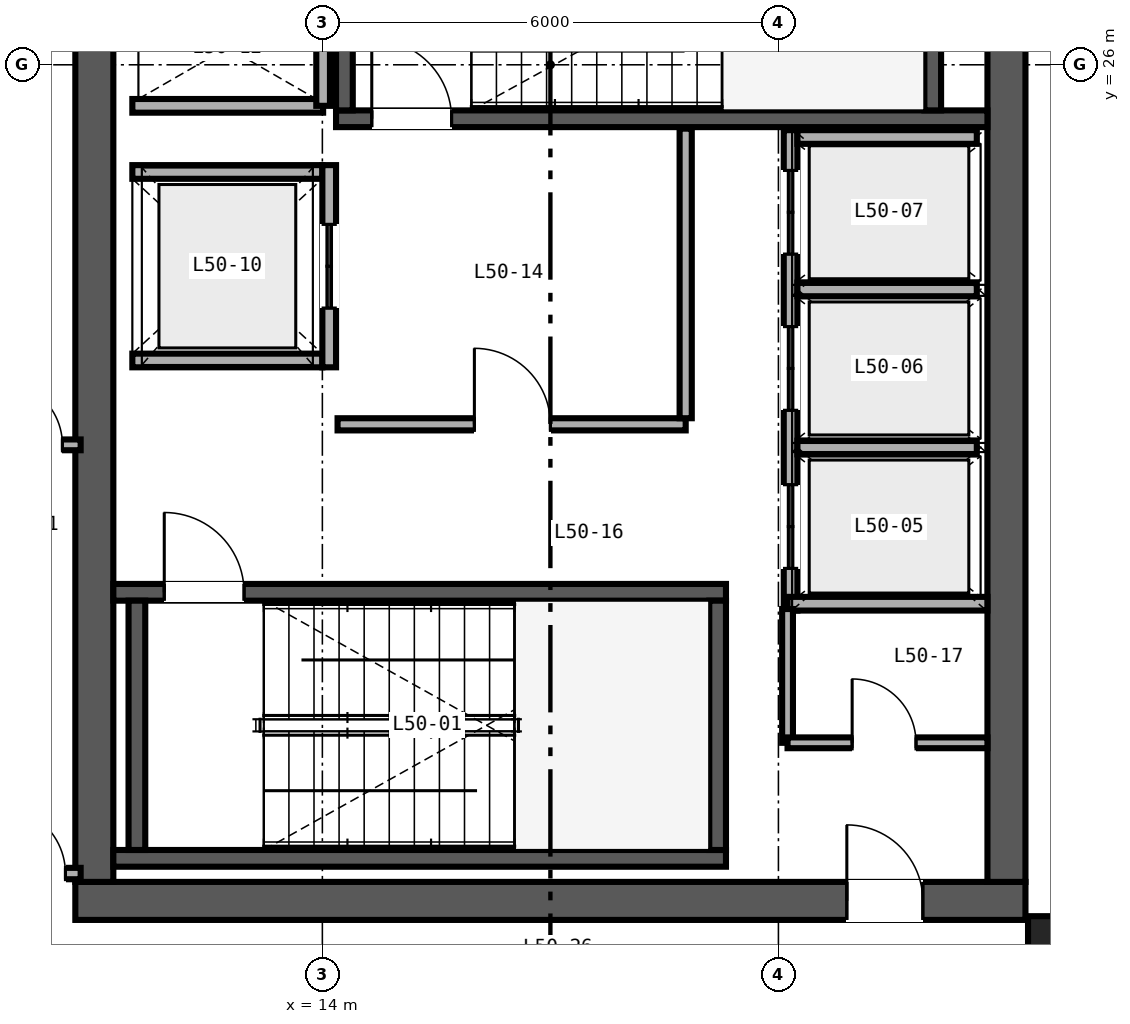
"""IFC4 building model, lengths in metres.
Left out: names, types, materials, properties, quantities, classifications, styles, units other than length and angle.
Written with IfcOpenShell. Run it as: python <this file> out.ifc"""

import sys

from ifc_helpers import new_model, si_unit, direction, frame, frame_2d, origin, origin_2d, place, context, subcontext, project, spatial, rectangle, i_section, extrude, source, transform, mapped, element, fill, save


model = new_model("IFC4")
c1 = context("Model", 3, precision=1e-05, world=origin(), true_north=direction((0.0, 1.0)))
c2 = subcontext(c1, "Body", "Model", "MODEL_VIEW")
j1 = project(units=[si_unit("LENGTHUNIT", "METRE"), si_unit("PLANEANGLEUNIT", "RADIAN")], contexts=[c1])
p1 = place(None, origin())
s1 = spatial("IfcSite", under=j1, at=p1, CompositionType="ELEMENT")
p2 = place(p1, origin())
s2 = spatial("IfcBuilding", under=s1, at=p2, CompositionType="ELEMENT")
p3 = place(p2, frame((0.0, 0.0, 199.2)))
s3 = spatial("IfcBuildingStorey", under=s2, at=p3, CompositionType="ELEMENT", Elevation=199.2)
p4 = place(p3, frame((10.75, 15.0, 0.0), z_axis=(0.0, 0.0, 1.0), x_axis=(1.0, 0.0, 0.0)))
e1 = element("IfcWall", 1, at=p4, inside=s3, PredefinedType="SHEAR", context=c2, shape_type="SweptSolid", body=[
    extrude(rectangle(XDim=12.5, YDim=0.5, at=frame_2d((6.25, 0.0))), origin(), (0.0, 0.0, 1.0), 3.37),
])
p5 = place(p4, frame((10.15, 0.0, 0.0)))
e2 = element("IfcOpeningElement", 2, at=p5, cuts=e1, PredefinedType="OPENING", context=c2, shape_type="SweptSolid", body=[
    extrude(rectangle(XDim=1.0, YDim=2.15, at=frame_2d((0.5, 1.075))), frame((0.0, 0.26, 0.0), z_axis=(0.0, -1.0, 0.0), x_axis=(1.0, 0.0, 0.0)), (0.0, 0.0, 1.0), 0.52),
])
for number, where, z_axis, x_axis in (
    (3, (11.0, 15.25, 0.0), (0.0, 0.0, 1.0), (0.0, 1.0, 0.0)),
    (4, (23.0, 15.25, 0.0), (0.0, 0.0, 1.0), (0.0, 1.0, 0.0)),
):
    element("IfcWall", number, at=place(p3, frame(where, z_axis=z_axis, x_axis=x_axis)), inside=s3, PredefinedType="SHEAR", context=c2, shape_type="SweptSolid", body=[
        extrude(rectangle(XDim=21.5, YDim=0.5, at=frame_2d((10.75, 0.0))), origin(), (0.0, 0.0, 1.0), 3.37),
    ])
p6 = place(p3, frame((11.25, 15.56, 0.0), z_axis=(0.0, 0.0, 1.0), x_axis=(1.0, 0.0, 0.0)))
e5 = element("IfcWall", 5, at=p6, inside=s3, PredefinedType="SHEAR", context=c2, shape_type="SweptSolid", body=[
    extrude(rectangle(XDim=8.06, YDim=0.22, at=frame_2d((4.03, 0.0))), origin(), (0.0, 0.0, 1.0), 3.4),
])
p7 = place(p3, frame((11.25, 19.06, 0.0), z_axis=(0.0, 0.0, 1.0), x_axis=(1.0, 0.0, 0.0)))
e6 = element("IfcWall", 6, at=p7, inside=s3, PredefinedType="SHEAR", context=c2, shape_type="SweptSolid", body=[
    extrude(rectangle(XDim=8.06, YDim=0.22, at=frame_2d((4.03, 0.0))), origin(), (0.0, 0.0, 1.0), 3.4),
])
p8 = place(p7, frame((0.67, 0.0, 0.0)))
e7 = element("IfcOpeningElement", 7, at=p8, cuts=e6, PredefinedType="OPENING", context=c2, shape_type="SweptSolid", body=[
    extrude(rectangle(XDim=1.05, YDim=2.15, at=frame_2d((0.525, 1.075))), frame((0.0, 0.12, 0.0), z_axis=(0.0, -1.0, 0.0), x_axis=(1.0, 0.0, 0.0)), (0.0, 0.0, 1.0), 0.24),
])
for number, where, z_axis, x_axis in (
    (8, (11.56, 15.67, 0.0), (0.0, 0.0, 1.0), (0.0, 1.0, 0.0)),
    (9, (19.2, 15.67, 0.0), (0.0, 0.0, 1.0), (0.0, 1.0, 0.0)),
):
    element("IfcWall", number, at=place(p3, frame(where, z_axis=z_axis, x_axis=x_axis)), inside=s3, PredefinedType="SHEAR", context=c2, shape_type="SweptSolid", body=[
        extrude(rectangle(XDim=3.28, YDim=0.22, at=frame_2d((1.64, 0.0))), origin(), (0.0, 0.0, 1.0), 3.4),
    ])
p9 = place(p3, frame((14.18, 25.29, 0.0), z_axis=(0.0, 0.0, 1.0), x_axis=(1.0, 0.0, 0.0)))
e10 = element("IfcWall", 10, at=p9, inside=s3, PredefinedType="SHEAR", context=c2, shape_type="SweptSolid", body=[
    extrude(rectangle(XDim=8.57, YDim=0.22, at=frame_2d((4.285, 0.0))), origin(), (0.0, 0.0, 1.0), 3.4),
])
p10 = place(p9, frame((0.47, 0.0, 0.0)))
e11 = element("IfcOpeningElement", 11, at=p10, cuts=e10, PredefinedType="OPENING", context=c2, shape_type="SweptSolid", body=[
    extrude(rectangle(XDim=1.05, YDim=2.15, at=frame_2d((0.525, 1.075))), frame((0.0, 0.12, 0.0), z_axis=(0.0, -1.0, 0.0), x_axis=(1.0, 0.0, 0.0)), (0.0, 0.0, 1.0), 0.24),
])
for number, where, z_axis, x_axis in (
    (12, (14.29, 25.4, 0.0), (0.0, 0.0, 1.0), (0.0, 1.0, 0.0)),
    (13, (22.03, 25.4, 0.0), (0.0, 0.0, 1.0), (0.0, 1.0, 0.0)),
):
    element("IfcWall", number, at=place(p3, frame(where, z_axis=z_axis, x_axis=x_axis)), inside=s3, PredefinedType="SHEAR", context=c2, shape_type="SweptSolid", body=[
        extrude(rectangle(XDim=3.28, YDim=0.22, at=frame_2d((1.64, 0.0))), origin(), (0.0, 0.0, 1.0), 3.4),
    ])
m1 = source(origin(), c2, "Body", "SweptSolid", [
    extrude(i_section(OverallWidth=0.432, OverallDepth=0.498, WebThickness=0.056, FlangeThickness=0.089, FilletRadius=0.025, at=origin_2d()), origin(), (0.0, 0.0, 1.0), 3.37),
])
p11 = place(p3, frame((23.5, 14.55, 0.0), z_axis=(0.0, 0.0, 1.0), x_axis=(1.0, 0.0, 0.0)))
e14 = element("IfcColumn", 14, at=p11, inside=s3, PredefinedType="COLUMN", context=c2, shape_type="MappedRepresentation", body=[
    mapped(m1, transform((0.0, 0.0, 0.0), scale=1.0)),
])
p12 = place(p3, frame((20.16, 18.82, 0.0), z_axis=(0.0, 0.0, 1.0), x_axis=(0.0, 1.0, 0.0)))
e15 = element("IfcWall", 15, at=p12, inside=s3, PredefinedType="SOLIDWALL", context=c2, shape_type="SweptSolid", body=[
    extrude(rectangle(XDim=6.32, YDim=0.18, at=frame_2d((3.16, 0.0))), origin(), (0.0, 0.0, 1.0), 2.47),
])
p13 = place(p12, frame((0.555, 0.0, 0.0)))
e16 = element("IfcOpeningElement", 16, at=p13, cuts=e15, PredefinedType="OPENING", context=c2, shape_type="SweptSolid", body=[
    extrude(rectangle(XDim=1.1, YDim=2.2, at=frame_2d((0.55, 1.1))), frame((0.0, 0.1, 0.0), z_axis=(0.0, -1.0, 0.0), x_axis=(1.0, 0.0, 0.0)), (0.0, 0.0, 1.0), 0.2),
])
p14 = place(p12, frame((2.635, 0.0, 0.0)))
e17 = element("IfcOpeningElement", 17, at=p14, cuts=e15, PredefinedType="OPENING", context=c2, shape_type="SweptSolid", body=[
    extrude(rectangle(XDim=1.1, YDim=2.2, at=frame_2d((0.55, 1.1))), frame((0.0, 0.1, 0.0), z_axis=(0.0, -1.0, 0.0), x_axis=(1.0, 0.0, 0.0)), (0.0, 0.0, 1.0), 0.2),
])
p15 = place(p12, frame((4.69, 0.0, 0.0)))
e18 = element("IfcOpeningElement", 18, at=p15, cuts=e15, PredefinedType="OPENING", context=c2, shape_type="SweptSolid", body=[
    extrude(rectangle(XDim=1.1, YDim=2.2, at=frame_2d((0.55, 1.1))), frame((0.0, 0.1, 0.0), z_axis=(0.0, -1.0, 0.0), x_axis=(1.0, 0.0, 0.0)), (0.0, 0.0, 1.0), 0.2),
])
p16 = place(p3, frame((20.12, 18.91, 0.0), z_axis=(0.0, 0.0, 1.0), x_axis=(1.0, 0.0, 0.0)))
e19 = element("IfcWall", 19, at=p16, inside=s3, PredefinedType="SOLIDWALL", context=c2, shape_type="SweptSolid", body=[
    extrude(rectangle(XDim=2.63, YDim=0.18, at=frame_2d((1.315, 0.0))), origin(), (0.0, 0.0, 1.0), 3.37),
])
p17 = place(p3, frame((20.25, 25.05, 0.0), z_axis=(0.0, 0.0, 1.0), x_axis=(1.0, 0.0, 0.0)))
e20 = element("IfcWall", 20, at=p17, inside=s3, PredefinedType="SOLIDWALL", context=c2, shape_type="SweptSolid", body=[
    extrude(rectangle(XDim=2.36, YDim=0.18, at=frame_2d((1.18, 0.0))), origin(), (0.0, 0.0, 1.0), 3.37),
])
p18 = place(p3, frame((20.25, 20.965, 0.0), z_axis=(0.0, 0.0, 1.0), x_axis=(1.0, 0.0, 0.0)))
e21 = element("IfcWall", 21, at=p18, inside=s3, PredefinedType="SOLIDWALL", context=c2, shape_type="SweptSolid", body=[
    extrude(rectangle(XDim=2.36, YDim=0.18, at=frame_2d((1.18, 0.0))), origin(), (0.0, 0.0, 1.0), 2.47),
])
p19 = place(p3, frame((20.25, 23.045, 0.0), z_axis=(0.0, 0.0, 1.0), x_axis=(1.0, 0.0, 0.0)))
e22 = element("IfcWall", 22, at=p19, inside=s3, PredefinedType="SOLIDWALL", context=c2, shape_type="SweptSolid", body=[
    extrude(rectangle(XDim=2.36, YDim=0.18, at=frame_2d((1.18, 0.0))), origin(), (0.0, 0.0, 1.0), 3.37),
])
for number, where, z_axis, x_axis in (
    (23, (11.5, 22.11, 0.0), (0.0, 0.0, 1.0), (1.0, 0.0, 0.0)),
    (24, (11.5, 24.59, 0.0), (0.0, 0.0, 1.0), (1.0, 0.0, 0.0)),
):
    element("IfcWall", number, at=place(p3, frame(where, z_axis=z_axis, x_axis=x_axis)), inside=s3, PredefinedType="SOLIDWALL", context=c2, shape_type="SweptSolid", body=[
        extrude(rectangle(XDim=2.5, YDim=0.18, at=frame_2d((1.25, 0.0))), origin(), (0.0, 0.0, 1.0), 3.37),
    ])
p20 = place(p3, frame((14.09, 22.02, 0.0), z_axis=(0.0, 0.0, 1.0), x_axis=(0.0, 1.0, 0.0)))
e25 = element("IfcWall", 25, at=p20, inside=s3, PredefinedType="SOLIDWALL", context=c2, shape_type="SweptSolid", body=[
    extrude(rectangle(XDim=2.66, YDim=0.18, at=frame_2d((1.33, 0.0))), origin(), (0.0, 0.0, 1.0), 3.37),
])
p21 = place(p20, frame((0.78, 0.0, 0.0)))
e26 = element("IfcOpeningElement", 26, at=p21, cuts=e25, PredefinedType="OPENING", context=c2, shape_type="SweptSolid", body=[
    extrude(rectangle(XDim=1.1, YDim=2.2, at=frame_2d((0.55, 1.1))), frame((0.0, 0.1, 0.0), z_axis=(0.0, -1.0, 0.0), x_axis=(1.0, 0.0, 0.0)), (0.0, 0.0, 1.0), 0.2),
])
p22 = place(p3, frame((11.5, 25.46, 0.0), z_axis=(0.0, 0.0, 1.0), x_axis=(1.0, 0.0, 0.0)))
e27 = element("IfcWall", 27, at=p22, inside=s3, PredefinedType="SOLIDWALL", context=c2, shape_type="SweptSolid", body=[
    extrude(rectangle(XDim=2.51, YDim=0.18, at=frame_2d((1.255, 0.0))), origin(), (0.0, 0.0, 1.0), 3.37),
])
p23 = place(p3, frame((14.01, 25.46, 0.0), z_axis=(0.0, 0.0, 1.0), x_axis=(0.0, 1.0, 0.0)))
e28 = element("IfcWall", 28, at=p23, inside=s3, PredefinedType="SOLIDWALL", context=c2, shape_type="SweptSolid", body=[
    extrude(rectangle(XDim=3.08, YDim=0.18, at=frame_2d((1.54, 0.0))), origin(), (0.0, 0.0, 1.0), 3.37),
])
p24 = place(p3, frame((14.2, 21.27, 0.0), z_axis=(0.0, 0.0, 1.0), x_axis=(1.0, 0.0, 0.0)))
e29 = element("IfcWall", 29, at=p24, inside=s3, PredefinedType="PARTITIONING", context=c2, shape_type="SweptSolid", body=[
    extrude(rectangle(XDim=4.58, YDim=0.16, at=frame_2d((2.29, 0.0))), origin(), (0.0, 0.0, 1.0), 3.37),
])
p25 = place(p24, frame((1.8, 0.0, 0.0)))
e30 = element("IfcOpeningElement", 30, at=p25, cuts=e29, PredefinedType="OPENING", context=c2, shape_type="SweptSolid", body=[
    extrude(rectangle(XDim=1.0, YDim=2.15, at=frame_2d((0.5, 1.075))), frame((0.0, 0.09, 0.0), z_axis=(0.0, -1.0, 0.0), x_axis=(1.0, 0.0, 0.0)), (0.0, 0.0, 1.0), 0.18),
])
p26 = place(p3, frame((18.78, 21.35, 0.0), z_axis=(0.0, 0.0, 1.0), x_axis=(0.0, 1.0, 0.0)))
e31 = element("IfcWall", 31, at=p26, inside=s3, PredefinedType="PARTITIONING", context=c2, shape_type="SweptSolid", body=[
    extrude(rectangle(XDim=3.81, YDim=0.16, at=frame_2d((1.905, 0.0))), origin(), (0.0, 0.0, 1.0), 3.37),
])
p27 = place(p3, frame((20.12, 17.08, 0.0), z_axis=(0.0, 0.0, 1.0), x_axis=(0.0, 1.0, 0.0)))
e32 = element("IfcWall", 32, at=p27, inside=s3, PredefinedType="PARTITIONING", context=c2, shape_type="SweptSolid", body=[
    extrude(rectangle(XDim=1.76, YDim=0.142, at=frame_2d((0.88, 0.0))), origin(), (0.0, 0.0, 1.0), 3.37),
])
p28 = place(p3, frame((20.12, 17.08, 0.0), z_axis=(0.0, 0.0, 1.0), x_axis=(1.0, 0.0, 0.0)))
e33 = element("IfcWall", 33, at=p28, inside=s3, PredefinedType="PARTITIONING", context=c2, shape_type="SweptSolid", body=[
    extrude(rectangle(XDim=2.63, YDim=0.142, at=frame_2d((1.315, 0.0))), origin(), (0.0, 0.0, 1.0), 3.37),
])
p29 = place(p28, frame((0.85, 0.0, 0.0)))
e34 = element("IfcOpeningElement", 34, at=p29, cuts=e33, PredefinedType="OPENING", context=c2, shape_type="SweptSolid", body=[
    extrude(rectangle(XDim=0.84, YDim=2.1, at=frame_2d((0.42, 1.05))), frame((0.0, 0.081, 0.0), z_axis=(0.0, -1.0, 0.0), x_axis=(1.0, 0.0, 0.0)), (0.0, 0.0, 1.0), 0.162),
])
p30 = place(p3, frame((8.16, 15.36, 0.0), z_axis=(0.0, 0.0, 1.0), x_axis=(1.0, 0.0, 0.0)))
e35 = element("IfcWall", 35, at=p30, inside=s3, PredefinedType="PARTITIONING", context=c2, shape_type="SweptSolid", body=[
    extrude(rectangle(XDim=2.66, YDim=0.15, at=frame_2d((1.33, 0.0))), origin(), (0.0, 0.0, 1.0), 2.591),
])
p31 = place(p30, frame((1.58, 0.0, 0.0)))
e36 = element("IfcOpeningElement", 36, at=p31, cuts=e35, PredefinedType="OPENING", context=c2, shape_type="SweptSolid", body=[
    extrude(rectangle(XDim=0.88, YDim=2.15, at=frame_2d((0.44, 1.075))), frame((0.0, 0.085, 0.0), z_axis=(0.0, -1.0, 0.0), x_axis=(1.0, 0.0, 0.0)), (0.0, 0.0, 1.0), 0.17),
])
p32 = place(p3, frame((8.16, 21.0, 0.0), z_axis=(0.0, 0.0, 1.0), x_axis=(1.0, 0.0, 0.0)))
e37 = element("IfcWall", 37, at=p32, inside=s3, PredefinedType="PARTITIONING", context=c2, shape_type="SweptSolid", body=[
    extrude(rectangle(XDim=2.66, YDim=0.142, at=frame_2d((1.33, 0.0))), origin(), (0.0, 0.0, 1.0), 2.47),
])
p33 = place(p32, frame((1.58, 0.0, 0.0)))
e38 = element("IfcOpeningElement", 38, at=p33, cuts=e37, PredefinedType="OPENING", context=c2, shape_type="SweptSolid", body=[
    extrude(rectangle(XDim=0.84, YDim=2.1, at=frame_2d((0.42, 1.05))), frame((0.0, 0.081, 0.0), z_axis=(0.0, -1.0, 0.0), x_axis=(1.0, 0.0, 0.0)), (0.0, 0.0, 1.0), 0.162),
])
m2 = source(origin(), c2, "Body", "SweptSolid", [
    extrude(rectangle(XDim=1.05, YDim=2.15, at=frame_2d((0.525, 1.075))), frame((0.0, 0.025, 0.0), z_axis=(0.0, -1.0, 0.0), x_axis=(1.0, 0.0, 0.0)), (0.0, 0.0, 1.0), 0.05),
])
p34 = place(p8, origin())
e39 = element("IfcDoor", 39, at=p34, inside=s3, OperationType="SINGLE_SWING_LEFT", PredefinedType="DOOR", context=c2, shape_type="MappedRepresentation", body=[
    mapped(m2, transform((0.0, 0.0, 0.0), scale=1.0)),
])
fill(e7, e39)
p35 = place(p10, origin())
e40 = element("IfcDoor", 40, at=p35, inside=s3, OperationType="SINGLE_SWING_LEFT", PredefinedType="DOOR", context=c2, shape_type="MappedRepresentation", body=[
    mapped(m2, transform((0.0, 0.0, 0.0), scale=1.0)),
])
fill(e11, e40)
m3 = source(origin(), c2, "Body", "SweptSolid", [
    extrude(rectangle(XDim=1.1, YDim=2.2, at=frame_2d((0.55, 1.1))), frame((0.0, 0.025, 0.0), z_axis=(0.0, -1.0, 0.0), x_axis=(1.0, 0.0, 0.0)), (0.0, 0.0, 1.0), 0.05),
])
p36 = place(p13, origin())
e41 = element("IfcDoor", 41, at=p36, inside=s3, OperationType="DOUBLE_DOOR_SLIDING", PredefinedType="DOOR", context=c2, shape_type="MappedRepresentation", body=[
    mapped(m3, transform((0.0, 0.0, 0.0), scale=1.0)),
])
fill(e16, e41)
p37 = place(p14, origin())
e42 = element("IfcDoor", 42, at=p37, inside=s3, OperationType="DOUBLE_DOOR_SLIDING", PredefinedType="DOOR", context=c2, shape_type="MappedRepresentation", body=[
    mapped(m3, transform((0.0, 0.0, 0.0), scale=1.0)),
])
fill(e17, e42)
p38 = place(p15, origin())
e43 = element("IfcDoor", 43, at=p38, inside=s3, OperationType="DOUBLE_DOOR_SLIDING", PredefinedType="DOOR", context=c2, shape_type="MappedRepresentation", body=[
    mapped(m3, transform((0.0, 0.0, 0.0), scale=1.0)),
])
fill(e18, e43)
p39 = place(p21, origin())
e44 = element("IfcDoor", 44, at=p39, inside=s3, OperationType="DOUBLE_DOOR_SLIDING", PredefinedType="DOOR", context=c2, shape_type="MappedRepresentation", body=[
    mapped(m3, transform((0.0, 0.0, 0.0), scale=1.0)),
])
fill(e26, e44)
m4 = source(origin(), c2, "Body", "SweptSolid", [
    extrude(rectangle(XDim=1.0, YDim=2.15, at=frame_2d((0.5, 1.075))), frame((0.0, 0.025, 0.0), z_axis=(0.0, -1.0, 0.0), x_axis=(1.0, 0.0, 0.0)), (0.0, 0.0, 1.0), 0.05),
])
p40 = place(p25, origin())
e45 = element("IfcDoor", 45, at=p40, inside=s3, OperationType="SINGLE_SWING_LEFT", PredefinedType="DOOR", context=c2, shape_type="MappedRepresentation", body=[
    mapped(m4, transform((0.0, 0.0, 0.0), scale=1.0)),
])
fill(e30, e45)
m5 = source(origin(), c2, "Body", "SweptSolid", [
    extrude(rectangle(XDim=0.84, YDim=2.1, at=frame_2d((0.42, 1.05))), frame((0.0, 0.025, 0.0), z_axis=(0.0, -1.0, 0.0), x_axis=(1.0, 0.0, 0.0)), (0.0, 0.0, 1.0), 0.05),
])
p41 = place(p29, origin())
e46 = element("IfcDoor", 46, at=p41, inside=s3, OperationType="SINGLE_SWING_LEFT", PredefinedType="DOOR", context=c2, shape_type="MappedRepresentation", body=[
    mapped(m5, transform((0.0, 0.0, 0.0), scale=1.0)),
])
fill(e34, e46)
p42 = place(p5, origin())
e47 = element("IfcDoor", 47, at=p42, inside=s3, OperationType="SINGLE_SWING_LEFT", PredefinedType="DOOR", context=c2, shape_type="MappedRepresentation", body=[
    mapped(m4, transform((0.0, 0.0, 0.0), scale=1.0)),
])
fill(e2, e47)
m6 = source(origin(), c2, "Body", "SweptSolid", [
    extrude(rectangle(XDim=0.88, YDim=2.15, at=frame_2d((0.44, 1.075))), frame((0.0, 0.025, 0.0), z_axis=(0.0, -1.0, 0.0), x_axis=(1.0, 0.0, 0.0)), (0.0, 0.0, 1.0), 0.05),
])
p43 = place(p31, origin())
e48 = element("IfcDoor", 48, at=p43, inside=s3, OperationType="SINGLE_SWING_LEFT", PredefinedType="DOOR", context=c2, shape_type="MappedRepresentation", body=[
    mapped(m6, transform((0.0, 0.0, 0.0), scale=1.0)),
])
fill(e36, e48)
p44 = place(p33, origin())
e49 = element("IfcDoor", 49, at=p44, inside=s3, OperationType="SINGLE_SWING_LEFT", PredefinedType="DOOR", context=c2, shape_type="MappedRepresentation", body=[
    mapped(m5, transform((0.0, 0.0, 0.0), scale=1.0)),
])
fill(e38, e49)
save(model, sys.argv[1])
